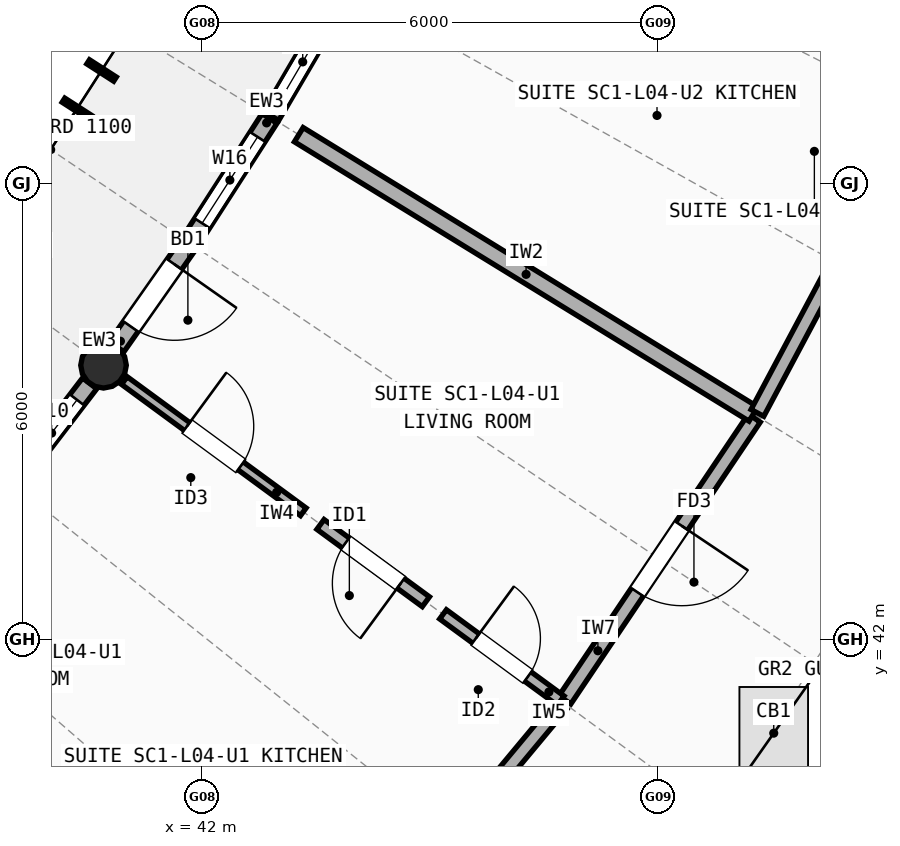
"""IFC4 building model, lengths in metres.
Left out: names, types, materials, properties, quantities, classifications, styles, units other than length and angle.
Written with IfcOpenShell. Run it as: python <this file> out.ifc"""

import sys

from ifc_helpers import new_model, si_unit, direction, frame, frame_2d, origin, origin_2d, place, context, subcontext, project, spatial, rectangle, circle, extrude, element, fill, save


model = new_model("IFC4")
c1 = context("Model", 3, precision=1e-05, world=origin(), true_north=direction((0.0, 1.0)))
c2 = subcontext(c1, "Body", "Model", "MODEL_VIEW")
j1 = project(units=[si_unit("LENGTHUNIT", "METRE"), si_unit("PLANEANGLEUNIT", "RADIAN")], contexts=[c1])
p1 = place(None, origin())
s1 = spatial("IfcSite", under=j1, at=p1, CompositionType="ELEMENT")
p2 = place(p1, origin())
s2 = spatial("IfcBuilding", under=s1, at=p2, CompositionType="ELEMENT")
p3 = place(p2, frame((0.0, 0.0, 14.1)))
s3 = spatial("IfcBuildingStorey", under=s2, at=p3, CompositionType="ELEMENT", Elevation=14.1)
p4 = place(p3, frame((40.704, 45.61, 0.0), z_axis=(0.0, 0.0, 1.0), x_axis=(1.0, 0.0, 0.0)))
e1 = element("IfcColumn", 1, at=p4, inside=s3, PredefinedType="COLUMN", context=c2, shape_type="SweptSolid", body=[
    extrude(circle(Radius=0.3, at=origin_2d()), origin(), (0.0, 0.0, 1.0), 2.948),
])
p5 = place(p3, frame((39.521, 44.064, 0.0), z_axis=(0.0, 0.0, 1.0), x_axis=(0.607846242362, 0.794054749779, 0.0)))
e2 = element("IfcWall", 2, at=p5, inside=s3, PredefinedType="STANDARD", context=c2, shape_type="SweptSolid", body=[
    extrude(rectangle(XDim=1.647, YDim=0.235, at=frame_2d((0.823, 0.0))), origin(), (0.0, 0.0, 1.0), 2.684),
])
p6 = place(p5, frame((0.273, 0.0, 0.85)))
e3 = element("IfcOpeningElement", 3, at=p6, cuts=e2, PredefinedType="OPENING", context=c2, shape_type="SweptSolid", body=[
    extrude(rectangle(XDim=1.1, YDim=1.45, at=frame_2d((0.55, 0.725))), frame((0.0, 0.127, 0.0), z_axis=(0.0, -1.0, 0.0), x_axis=(1.0, 0.0, 0.0)), (0.0, 0.0, 1.0), 0.255),
])
p7 = place(p3, frame((40.876, 45.855, 0.0), z_axis=(0.0, 0.0, 1.0), x_axis=(0.574755063072, 0.818325496043, 0.0)))
e4 = element("IfcWall", 4, at=p7, inside=s3, PredefinedType="STANDARD", context=c2, shape_type="SweptSolid", body=[
    extrude(rectangle(XDim=1.647, YDim=0.235, at=frame_2d((0.823, 0.0))), origin(), (0.0, 0.0, 1.0), 2.684),
])
p8 = place(p7, frame((0.323, 0.0, 0.0)))
e5 = element("IfcOpeningElement", 5, at=p8, cuts=e4, PredefinedType="OPENING", context=c2, shape_type="SweptSolid", body=[
    extrude(rectangle(XDim=1.0, YDim=2.15, at=frame_2d((0.5, 1.075))), frame((0.0, 0.127, 0.0), z_axis=(0.0, -1.0, 0.0), x_axis=(1.0, 0.0, 0.0)), (0.0, 0.0, 1.0), 0.255),
])
p9 = place(p3, frame((41.845, 47.236, 0.0), z_axis=(0.0, 0.0, 1.0), x_axis=(0.540911277163, 0.841079657486, 0.0)))
e6 = element("IfcWall", 6, at=p9, inside=s3, PredefinedType="STANDARD", context=c2, shape_type="SweptSolid", body=[
    extrude(rectangle(XDim=1.927, YDim=0.235, at=frame_2d((0.963, 0.0))), origin(), (0.0, 0.0, 1.0), 2.684),
])
p10 = place(p9, frame((0.288, 0.0, 0.85)))
e7 = element("IfcOpeningElement", 7, at=p10, cuts=e6, PredefinedType="OPENING", context=c2, shape_type="SweptSolid", body=[
    extrude(rectangle(XDim=1.35, YDim=1.5, at=frame_2d((0.675, 0.75))), frame((0.0, 0.127, 0.0), z_axis=(0.0, -1.0, 0.0), x_axis=(1.0, 0.0, 0.0)), (0.0, 0.0, 1.0), 0.255),
])
p11 = place(p3, frame((42.908, 48.891, 0.0), z_axis=(0.0, 0.0, 1.0), x_axis=(0.505879302059, 0.862604272971, 0.0)))
e8 = element("IfcWall", 8, at=p11, inside=s3, PredefinedType="STANDARD", context=c2, shape_type="SweptSolid", body=[
    extrude(rectangle(XDim=1.647, YDim=0.235, at=frame_2d((0.823, 0.0))), origin(), (0.0, 0.0, 1.0), 2.684),
])
p12 = place(p11, frame((0.223, 0.0, 0.85)))
e9 = element("IfcOpeningElement", 9, at=p12, cuts=e8, PredefinedType="OPENING", context=c2, shape_type="SweptSolid", body=[
    extrude(rectangle(XDim=1.2, YDim=1.35, at=frame_2d((0.6, 0.675))), frame((0.0, 0.127, 0.0), z_axis=(0.0, -1.0, 0.0), x_axis=(1.0, 0.0, 0.0)), (0.0, 0.0, 1.0), 0.255),
])
p13 = place(p3, frame((42.414, 35.965, 0.0), z_axis=(0.0, 0.0, 1.0), x_axis=(0.639849364326, 0.768500351966, 0.0)))
e10 = element("IfcWall", 10, at=p13, inside=s3, PredefinedType="SOLIDWALL", context=c2, shape_type="SweptSolid", body=[
    extrude(rectangle(XDim=6.739, YDim=0.19, at=frame_2d((3.369, 0.0))), origin(), (0.0, 0.0, 1.0), 2.742),
])
p14 = place(p3, frame((46.774, 41.207, 0.0), z_axis=(0.0, 0.0, 1.0), x_axis=(0.55793724224, 0.829883144619, 0.0)))
e11 = element("IfcWall", 11, at=p14, inside=s3, PredefinedType="SOLIDWALL", context=c2, shape_type="SweptSolid", body=[
    extrude(rectangle(XDim=4.467, YDim=0.19, at=frame_2d((2.234, 0.0))), origin(), (0.0, 0.0, 1.0), 2.742),
])
p15 = place(p14, frame((1.708, 0.0, 0.0)))
e12 = element("IfcOpeningElement", 12, at=p15, cuts=e11, PredefinedType="OPENING", context=c2, shape_type="SweptSolid", body=[
    extrude(rectangle(XDim=1.05, YDim=2.15, at=frame_2d((0.525, 1.075))), frame((0.0, 0.105, 0.0), z_axis=(0.0, -1.0, 0.0), x_axis=(1.0, 0.0, 0.0)), (0.0, 0.0, 1.0), 0.21),
])
p16 = place(p3, frame((40.978, 45.409, 0.0), z_axis=(0.0, 0.0, 1.0), x_axis=(0.806306627453, -0.591497778969, 0.0)))
e13 = element("IfcWall", 13, at=p16, inside=s3, PredefinedType="PARTITIONING", context=c2, shape_type="SweptSolid", body=[
    extrude(rectangle(XDim=2.92, YDim=0.125, at=frame_2d((1.46, 0.0))), origin(), (0.0, 0.0, 1.0), 2.722),
])
p17 = place(p16, frame((1.02, 0.0, 0.0)))
e14 = element("IfcOpeningElement", 14, at=p17, cuts=e13, PredefinedType="OPENING", context=c2, shape_type="SweptSolid", body=[
    extrude(rectangle(XDim=0.88, YDim=2.1, at=frame_2d((0.44, 1.05))), frame((0.0, 0.073, 0.0), z_axis=(0.0, -1.0, 0.0), x_axis=(1.0, 0.0, 0.0)), (0.0, 0.0, 1.0), 0.145),
])
p18 = place(p3, frame((43.559, 43.516, 0.0), z_axis=(0.0, 0.0, 1.0), x_axis=(0.806292157387, -0.591517503491, 0.0)))
e15 = element("IfcWall", 15, at=p18, inside=s3, PredefinedType="PLUMBINGWALL", context=c2, shape_type="SweptSolid", body=[
    extrude(rectangle(XDim=1.72, YDim=0.16, at=frame_2d((0.86, 0.0))), origin(), (0.0, 0.0, 1.0), 2.722),
])
p19 = place(p18, frame((0.41, 0.0, 0.0)))
e16 = element("IfcOpeningElement", 16, at=p19, cuts=e15, PredefinedType="OPENING", context=c2, shape_type="SweptSolid", body=[
    extrude(rectangle(XDim=0.9, YDim=2.1, at=frame_2d((0.45, 1.05))), frame((0.0, 0.09, 0.0), z_axis=(0.0, -1.0, 0.0), x_axis=(1.0, 0.0, 0.0)), (0.0, 0.0, 1.0), 0.18),
])
p20 = place(p3, frame((45.171, 42.333, 0.0), z_axis=(0.0, 0.0, 1.0), x_axis=(0.806348393053, -0.591440841522, 0.0)))
e17 = element("IfcWall", 17, at=p20, inside=s3, PredefinedType="PARTITIONING", context=c2, shape_type="SweptSolid", body=[
    extrude(rectangle(XDim=1.92, YDim=0.15, at=frame_2d((0.96, 0.0))), origin(), (0.0, 0.0, 1.0), 2.722),
])
p21 = place(p20, frame((0.535, 0.0, 0.0)))
e18 = element("IfcOpeningElement", 18, at=p21, cuts=e17, PredefinedType="OPENING", context=c2, shape_type="SweptSolid", body=[
    extrude(rectangle(XDim=0.85, YDim=2.1, at=frame_2d((0.425, 1.05))), frame((0.0, 0.085, 0.0), z_axis=(0.0, -1.0, 0.0), x_axis=(1.0, 0.0, 0.0)), (0.0, 0.0, 1.0), 0.17),
])
p22 = place(p3, frame((43.273, 48.643, 0.0), z_axis=(0.0, 0.0, 1.0), x_axis=(0.852035433886, -0.523484115713, 0.0)))
e19 = element("IfcWall", 19, at=p22, inside=s3, PredefinedType="SOLIDWALL", context=c2, shape_type="SweptSolid", body=[
    extrude(rectangle(XDim=7.02, YDim=0.22, at=frame_2d((3.51, 0.0))), origin(), (0.0, 0.0, 1.0), 2.762),
])
p23 = place(p3, frame((49.307, 44.983, 0.0), z_axis=(0.0, 0.0, 1.0), x_axis=(0.47013685006, 0.88259353171, 0.0)))
e20 = element("IfcWall", 20, at=p23, inside=s3, PredefinedType="SOLIDWALL", context=c2, shape_type="SweptSolid", body=[
    extrude(rectangle(XDim=6.738, YDim=0.19, at=frame_2d((3.369, 0.0))), origin(), (0.0, 0.0, 1.0), 2.722),
])
p24 = place(p6, origin())
e21 = element("IfcWindow", 21, at=p24, inside=s3, PartitioningType="SINGLE_PANEL", PredefinedType="WINDOW", context=c2, shape_type="SweptSolid", body=[
    extrude(rectangle(XDim=1.1, YDim=1.45, at=frame_2d((0.55, 0.725))), frame((0.0, 0.03, 0.0), z_axis=(0.0, -1.0, 0.0), x_axis=(1.0, 0.0, 0.0)), (0.0, 0.0, 1.0), 0.06),
])
fill(e3, e21)
p25 = place(p8, origin())
e22 = element("IfcDoor", 22, at=p25, inside=s3, OperationType="SINGLE_SWING_RIGHT", PredefinedType="DOOR", context=c2, shape_type="SweptSolid", body=[
    extrude(rectangle(XDim=1.0, YDim=2.15, at=frame_2d((0.5, 1.075))), frame((0.0, 0.025, 0.0), z_axis=(0.0, -1.0, 0.0), x_axis=(1.0, 0.0, 0.0)), (0.0, 0.0, 1.0), 0.05),
])
fill(e5, e22)
p26 = place(p10, origin())
e23 = element("IfcWindow", 23, at=p26, inside=s3, PartitioningType="SINGLE_PANEL", PredefinedType="WINDOW", context=c2, shape_type="SweptSolid", body=[
    extrude(rectangle(XDim=1.35, YDim=1.5, at=frame_2d((0.675, 0.75))), frame((0.0, 0.03, 0.0), z_axis=(0.0, -1.0, 0.0), x_axis=(1.0, 0.0, 0.0)), (0.0, 0.0, 1.0), 0.06),
])
fill(e7, e23)
p27 = place(p12, origin())
e24 = element("IfcWindow", 24, at=p27, inside=s3, PartitioningType="SINGLE_PANEL", PredefinedType="WINDOW", context=c2, shape_type="SweptSolid", body=[
    extrude(rectangle(XDim=1.2, YDim=1.35, at=frame_2d((0.6, 0.675))), frame((0.0, 0.03, 0.0), z_axis=(0.0, -1.0, 0.0), x_axis=(1.0, 0.0, 0.0)), (0.0, 0.0, 1.0), 0.06),
])
fill(e9, e24)
p28 = place(p15, origin())
e25 = element("IfcDoor", 25, at=p28, inside=s3, OperationType="SINGLE_SWING_RIGHT", PredefinedType="DOOR", context=c2, shape_type="SweptSolid", body=[
    extrude(rectangle(XDim=1.05, YDim=2.15, at=frame_2d((0.525, 1.075))), frame((0.0, 0.025, 0.0), z_axis=(0.0, -1.0, 0.0), x_axis=(1.0, 0.0, 0.0)), (0.0, 0.0, 1.0), 0.05),
])
fill(e12, e25)
p29 = place(p17, origin())
e26 = element("IfcDoor", 26, at=p29, inside=s3, OperationType="SINGLE_SWING_LEFT", PredefinedType="DOOR", context=c2, shape_type="SweptSolid", body=[
    extrude(rectangle(XDim=0.88, YDim=2.1, at=frame_2d((0.44, 1.05))), frame((0.0, 0.025, 0.0), z_axis=(0.0, -1.0, 0.0), x_axis=(1.0, 0.0, 0.0)), (0.0, 0.0, 1.0), 0.05),
])
fill(e14, e26)
p30 = place(p19, origin())
e27 = element("IfcDoor", 27, at=p30, inside=s3, OperationType="SINGLE_SWING_RIGHT", PredefinedType="DOOR", context=c2, shape_type="SweptSolid", body=[
    extrude(rectangle(XDim=0.9, YDim=2.1, at=frame_2d((0.45, 1.05))), frame((0.0, 0.025, 0.0), z_axis=(0.0, -1.0, 0.0), x_axis=(1.0, 0.0, 0.0)), (0.0, 0.0, 1.0), 0.05),
])
fill(e16, e27)
p31 = place(p21, origin())
e28 = element("IfcDoor", 28, at=p31, inside=s3, OperationType="SINGLE_SWING_LEFT", PredefinedType="DOOR", context=c2, shape_type="SweptSolid", body=[
    extrude(rectangle(XDim=0.85, YDim=2.1, at=frame_2d((0.425, 1.05))), frame((0.0, 0.025, 0.0), z_axis=(0.0, -1.0, 0.0), x_axis=(1.0, 0.0, 0.0)), (0.0, 0.0, 1.0), 0.05),
])
fill(e18, e28)
save(model, sys.argv[1])
